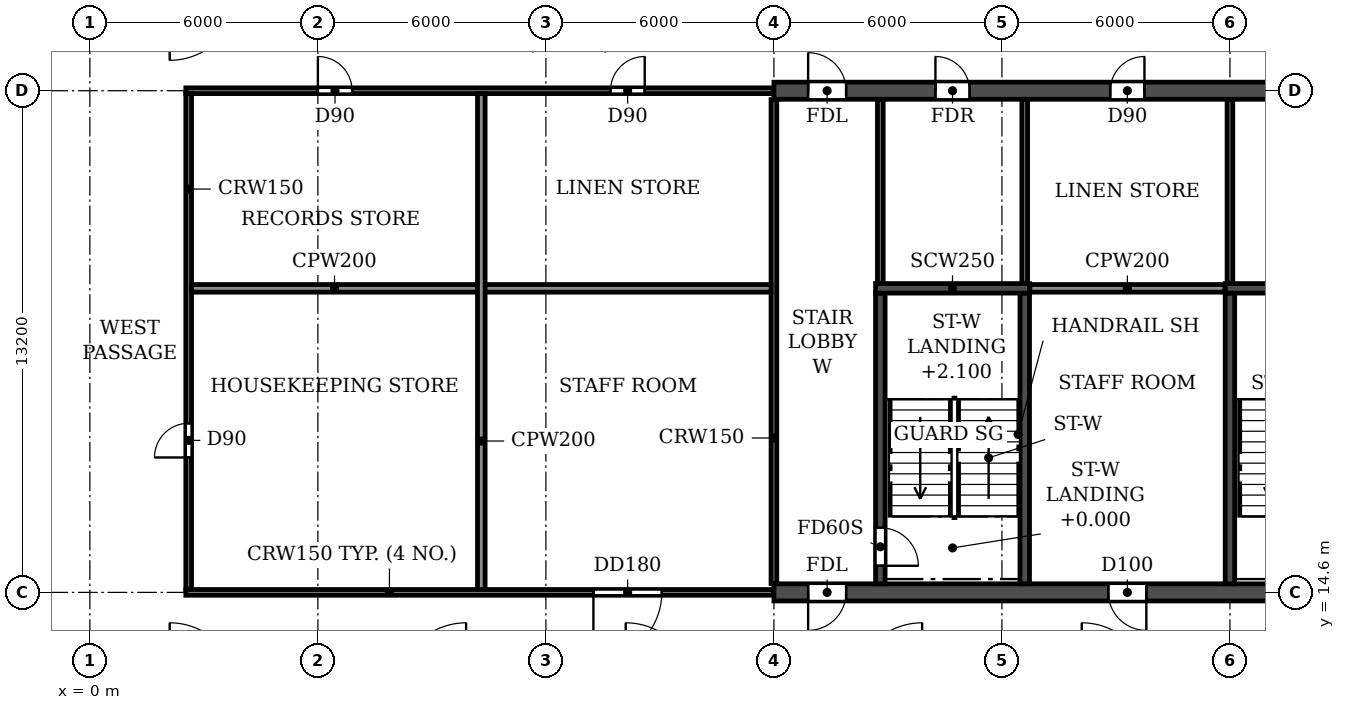
"""IFC4 building model, lengths in metres.
Left out: names, types, materials, properties, quantities, classifications, styles, units other than length and angle.
Written with IfcOpenShell. Run it as: python <this file> out.ifc"""

import sys

from ifc_helpers import new_model, si_unit, direction, frame, frame_2d, origin, place, context, subcontext, project, spatial, rectangle, extrude, element, fill, save


model = new_model("IFC4")
c1 = context("Model", 3, precision=1e-05, world=origin(), true_north=direction((0.0, 1.0)))
c2 = subcontext(c1, "Body", "Model", "MODEL_VIEW")
j1 = project(units=[si_unit("LENGTHUNIT", "METRE"), si_unit("PLANEANGLEUNIT", "RADIAN")], contexts=[c1])
p1 = place(None, origin())
s1 = spatial("IfcSite", under=j1, at=p1, CompositionType="ELEMENT")
p2 = place(p1, origin())
s2 = spatial("IfcBuilding", under=s1, at=p2, CompositionType="ELEMENT")
p3 = place(p2, frame((0.0, 0.0, 10.8)))
s3 = spatial("IfcBuildingStorey", under=s2, at=p3, CompositionType="ELEMENT", Elevation=10.8)
p4 = place(p3, frame((18.0, 14.6, 0.0), z_axis=(0.0, 0.0, 1.0), x_axis=(1.0, 0.0, 0.0)))
e1 = element("IfcWall", 1, at=p4, inside=s3, PredefinedType="SOLIDWALL", context=c2, shape_type="SweptSolid", body=[
    extrude(rectangle(XDim=66.0, YDim=0.45, at=frame_2d((33.0, 0.0))), origin(), (0.0, 0.0, 1.0), 3.92),
])
p5 = place(p4, frame((0.9, 0.0, 0.0)))
e2 = element("IfcOpeningElement", 2, at=p5, cuts=e1, PredefinedType="OPENING", context=c2, shape_type="SweptSolid", body=[
    extrude(rectangle(XDim=1.0, YDim=2.1, at=frame_2d((0.5, 1.05))), frame((0.0, 0.235, 0.0), z_axis=(0.0, -1.0, 0.0), x_axis=(1.0, 0.0, 0.0)), (0.0, 0.0, 1.0), 0.47),
])
p6 = place(p4, frame((8.8, 0.0, 0.0)))
e3 = element("IfcOpeningElement", 3, at=p6, cuts=e1, PredefinedType="OPENING", context=c2, shape_type="SweptSolid", body=[
    extrude(rectangle(XDim=1.0, YDim=2.1, at=frame_2d((0.5, 1.05))), frame((0.0, 0.235, 0.0), z_axis=(0.0, -1.0, 0.0), x_axis=(1.0, 0.0, 0.0)), (0.0, 0.0, 1.0), 0.47),
])
p7 = place(p4, frame((13.4, 0.0, 0.0)))
e4 = element("IfcOpeningElement", 4, at=p7, cuts=e1, PredefinedType="OPENING", context=c2, shape_type="SweptSolid", body=[
    extrude(rectangle(XDim=1.0, YDim=2.1, at=frame_2d((0.5, 1.05))), frame((0.0, 0.235, 0.0), z_axis=(0.0, -1.0, 0.0), x_axis=(1.0, 0.0, 0.0)), (0.0, 0.0, 1.0), 0.47),
])
p8 = place(p4, frame((24.7, 0.0, 0.0)))
e5 = element("IfcOpeningElement", 5, at=p8, cuts=e1, PredefinedType="OPENING", context=c2, shape_type="SweptSolid", body=[
    extrude(rectangle(XDim=1.0, YDim=2.1, at=frame_2d((0.5, 1.05))), frame((0.0, 0.235, 0.0), z_axis=(0.0, -1.0, 0.0), x_axis=(1.0, 0.0, 0.0)), (0.0, 0.0, 1.0), 0.47),
])
p9 = place(p4, frame((28.6, 0.0, 0.0)))
e6 = element("IfcOpeningElement", 6, at=p9, cuts=e1, PredefinedType="OPENING", context=c2, shape_type="SweptSolid", body=[
    extrude(rectangle(XDim=1.0, YDim=2.1, at=frame_2d((0.5, 1.05))), frame((0.0, 0.235, 0.0), z_axis=(0.0, -1.0, 0.0), x_axis=(1.0, 0.0, 0.0)), (0.0, 0.0, 1.0), 0.47),
])
p10 = place(p4, frame((32.5, 0.0, 0.0)))
e7 = element("IfcOpeningElement", 7, at=p10, cuts=e1, PredefinedType="OPENING", context=c2, shape_type="SweptSolid", body=[
    extrude(rectangle(XDim=1.0, YDim=2.1, at=frame_2d((0.5, 1.05))), frame((0.0, 0.235, 0.0), z_axis=(0.0, -1.0, 0.0), x_axis=(1.0, 0.0, 0.0)), (0.0, 0.0, 1.0), 0.47),
])
p11 = place(p4, frame((35.1, 0.0, 0.0)))
e8 = element("IfcOpeningElement", 8, at=p11, cuts=e1, PredefinedType="OPENING", context=c2, shape_type="SweptSolid", body=[
    extrude(rectangle(XDim=1.0, YDim=2.1, at=frame_2d((0.5, 1.05))), frame((0.0, 0.235, 0.0), z_axis=(0.0, -1.0, 0.0), x_axis=(1.0, 0.0, 0.0)), (0.0, 0.0, 1.0), 0.47),
])
p12 = place(p4, frame((39.0, 0.0, 0.0)))
e9 = element("IfcOpeningElement", 9, at=p12, cuts=e1, PredefinedType="OPENING", context=c2, shape_type="SweptSolid", body=[
    extrude(rectangle(XDim=1.0, YDim=2.1, at=frame_2d((0.5, 1.05))), frame((0.0, 0.235, 0.0), z_axis=(0.0, -1.0, 0.0), x_axis=(1.0, 0.0, 0.0)), (0.0, 0.0, 1.0), 0.47),
])
p13 = place(p4, frame((51.6, 0.0, 0.0)))
e10 = element("IfcOpeningElement", 10, at=p13, cuts=e1, PredefinedType="OPENING", context=c2, shape_type="SweptSolid", body=[
    extrude(rectangle(XDim=1.0, YDim=2.1, at=frame_2d((0.5, 1.05))), frame((0.0, 0.235, 0.0), z_axis=(0.0, -1.0, 0.0), x_axis=(1.0, 0.0, 0.0)), (0.0, 0.0, 1.0), 0.47),
])
p14 = place(p4, frame((56.25, 0.0, 0.0)))
e11 = element("IfcOpeningElement", 11, at=p14, cuts=e1, PredefinedType="OPENING", context=c2, shape_type="SweptSolid", body=[
    extrude(rectangle(XDim=0.9, YDim=2.1, at=frame_2d((0.45, 1.05))), frame((0.0, 0.235, 0.0), z_axis=(0.0, -1.0, 0.0), x_axis=(1.0, 0.0, 0.0)), (0.0, 0.0, 1.0), 0.47),
])
p15 = place(p4, frame((64.1, 0.0, 0.0)))
e12 = element("IfcOpeningElement", 12, at=p15, cuts=e1, PredefinedType="OPENING", context=c2, shape_type="SweptSolid", body=[
    extrude(rectangle(XDim=1.0, YDim=2.1, at=frame_2d((0.5, 1.05))), frame((0.0, 0.235, 0.0), z_axis=(0.0, -1.0, 0.0), x_axis=(1.0, 0.0, 0.0)), (0.0, 0.0, 1.0), 0.47),
])
p16 = place(p3, frame((18.0, 27.8, 0.0), z_axis=(0.0, 0.0, 1.0), x_axis=(1.0, 0.0, 0.0)))
e13 = element("IfcWall", 13, at=p16, inside=s3, PredefinedType="SOLIDWALL", context=c2, shape_type="SweptSolid", body=[
    extrude(rectangle(XDim=66.0, YDim=0.45, at=frame_2d((33.0, 0.0))), origin(), (0.0, 0.0, 1.0), 3.92),
])
p17 = place(p16, frame((0.9, 0.0, 0.0)))
e14 = element("IfcOpeningElement", 14, at=p17, cuts=e13, PredefinedType="OPENING", context=c2, shape_type="SweptSolid", body=[
    extrude(rectangle(XDim=1.0, YDim=2.1, at=frame_2d((0.5, 1.05))), frame((0.0, 0.235, 0.0), z_axis=(0.0, -1.0, 0.0), x_axis=(1.0, 0.0, 0.0)), (0.0, 0.0, 1.0), 0.47),
])
p18 = place(p16, frame((4.25, 0.0, 0.0)))
e15 = element("IfcOpeningElement", 15, at=p18, cuts=e13, PredefinedType="OPENING", context=c2, shape_type="SweptSolid", body=[
    extrude(rectangle(XDim=0.9, YDim=2.1, at=frame_2d((0.45, 1.05))), frame((0.0, 0.235, 0.0), z_axis=(0.0, -1.0, 0.0), x_axis=(1.0, 0.0, 0.0)), (0.0, 0.0, 1.0), 0.47),
])
p19 = place(p16, frame((8.85, 0.0, 0.0)))
e16 = element("IfcOpeningElement", 16, at=p19, cuts=e13, PredefinedType="OPENING", context=c2, shape_type="SweptSolid", body=[
    extrude(rectangle(XDim=0.9, YDim=2.1, at=frame_2d((0.45, 1.05))), frame((0.0, 0.235, 0.0), z_axis=(0.0, -1.0, 0.0), x_axis=(1.0, 0.0, 0.0)), (0.0, 0.0, 1.0), 0.47),
])
p20 = place(p16, frame((13.45, 0.0, 0.0)))
e17 = element("IfcOpeningElement", 17, at=p20, cuts=e13, PredefinedType="OPENING", context=c2, shape_type="SweptSolid", body=[
    extrude(rectangle(XDim=0.9, YDim=2.1, at=frame_2d((0.45, 1.05))), frame((0.0, 0.235, 0.0), z_axis=(0.0, -1.0, 0.0), x_axis=(1.0, 0.0, 0.0)), (0.0, 0.0, 1.0), 0.47),
])
p21 = place(p16, frame((18.95, 0.0, 0.0)))
e18 = element("IfcOpeningElement", 18, at=p21, cuts=e13, PredefinedType="OPENING", context=c2, shape_type="SweptSolid", body=[
    extrude(rectangle(XDim=1.5, YDim=2.1, at=frame_2d((0.75, 1.05))), frame((0.0, 0.235, 0.0), z_axis=(0.0, -1.0, 0.0), x_axis=(1.0, 0.0, 0.0)), (0.0, 0.0, 1.0), 0.47),
])
p22 = place(p16, frame((24.4, 0.0, 0.0)))
e19 = element("IfcOpeningElement", 19, at=p22, cuts=e13, PredefinedType="OPENING", context=c2, shape_type="SweptSolid", body=[
    extrude(rectangle(XDim=1.0, YDim=2.1, at=frame_2d((0.5, 1.05))), frame((0.0, 0.235, 0.0), z_axis=(0.0, -1.0, 0.0), x_axis=(1.0, 0.0, 0.0)), (0.0, 0.0, 1.0), 0.47),
])
p23 = place(p16, frame((29.6, 0.0, 0.0)))
e20 = element("IfcOpeningElement", 20, at=p23, cuts=e13, PredefinedType="OPENING", context=c2, shape_type="SweptSolid", body=[
    extrude(rectangle(XDim=1.0, YDim=2.1, at=frame_2d((0.5, 1.05))), frame((0.0, 0.235, 0.0), z_axis=(0.0, -1.0, 0.0), x_axis=(1.0, 0.0, 0.0)), (0.0, 0.0, 1.0), 0.47),
])
p24 = place(p16, frame((32.5, 0.0, 0.0)))
e21 = element("IfcOpeningElement", 21, at=p24, cuts=e13, PredefinedType="OPENING", context=c2, shape_type="SweptSolid", body=[
    extrude(rectangle(XDim=1.0, YDim=2.1, at=frame_2d((0.5, 1.05))), frame((0.0, 0.235, 0.0), z_axis=(0.0, -1.0, 0.0), x_axis=(1.0, 0.0, 0.0)), (0.0, 0.0, 1.0), 0.47),
])
p25 = place(p16, frame((38.0, 0.0, 0.0)))
e22 = element("IfcOpeningElement", 22, at=p25, cuts=e13, PredefinedType="OPENING", context=c2, shape_type="SweptSolid", body=[
    extrude(rectangle(XDim=1.0, YDim=2.1, at=frame_2d((0.5, 1.05))), frame((0.0, 0.235, 0.0), z_axis=(0.0, -1.0, 0.0), x_axis=(1.0, 0.0, 0.0)), (0.0, 0.0, 1.0), 0.47),
])
p26 = place(p16, frame((43.2, 0.0, 0.0)))
e23 = element("IfcOpeningElement", 23, at=p26, cuts=e13, PredefinedType="OPENING", context=c2, shape_type="SweptSolid", body=[
    extrude(rectangle(XDim=1.0, YDim=2.1, at=frame_2d((0.5, 1.05))), frame((0.0, 0.235, 0.0), z_axis=(0.0, -1.0, 0.0), x_axis=(1.0, 0.0, 0.0)), (0.0, 0.0, 1.0), 0.47),
])
p27 = place(p16, frame((47.1, 0.0, 0.0)))
e24 = element("IfcOpeningElement", 24, at=p27, cuts=e13, PredefinedType="OPENING", context=c2, shape_type="SweptSolid", body=[
    extrude(rectangle(XDim=1.0, YDim=2.1, at=frame_2d((0.5, 1.05))), frame((0.0, 0.235, 0.0), z_axis=(0.0, -1.0, 0.0), x_axis=(1.0, 0.0, 0.0)), (0.0, 0.0, 1.0), 0.47),
])
p28 = place(p16, frame((51.65, 0.0, 0.0)))
e25 = element("IfcOpeningElement", 25, at=p28, cuts=e13, PredefinedType="OPENING", context=c2, shape_type="SweptSolid", body=[
    extrude(rectangle(XDim=0.9, YDim=2.1, at=frame_2d((0.45, 1.05))), frame((0.0, 0.235, 0.0), z_axis=(0.0, -1.0, 0.0), x_axis=(1.0, 0.0, 0.0)), (0.0, 0.0, 1.0), 0.47),
])
p29 = place(p16, frame((56.2, 0.0, 0.0)))
e26 = element("IfcOpeningElement", 26, at=p29, cuts=e13, PredefinedType="OPENING", context=c2, shape_type="SweptSolid", body=[
    extrude(rectangle(XDim=1.0, YDim=2.1, at=frame_2d((0.5, 1.05))), frame((0.0, 0.235, 0.0), z_axis=(0.0, -1.0, 0.0), x_axis=(1.0, 0.0, 0.0)), (0.0, 0.0, 1.0), 0.47),
])
p30 = place(p16, frame((60.85, 0.0, 0.0)))
e27 = element("IfcOpeningElement", 27, at=p30, cuts=e13, PredefinedType="OPENING", context=c2, shape_type="SweptSolid", body=[
    extrude(rectangle(XDim=0.9, YDim=2.1, at=frame_2d((0.45, 1.05))), frame((0.0, 0.235, 0.0), z_axis=(0.0, -1.0, 0.0), x_axis=(1.0, 0.0, 0.0)), (0.0, 0.0, 1.0), 0.47),
])
p31 = place(p16, frame((64.1, 0.0, 0.0)))
e28 = element("IfcOpeningElement", 28, at=p31, cuts=e13, PredefinedType="OPENING", context=c2, shape_type="SweptSolid", body=[
    extrude(rectangle(XDim=1.0, YDim=2.1, at=frame_2d((0.5, 1.05))), frame((0.0, 0.235, 0.0), z_axis=(0.0, -1.0, 0.0), x_axis=(1.0, 0.0, 0.0)), (0.0, 0.0, 1.0), 0.47),
])
p32 = place(p3, frame((30.0, 14.825, 0.0), z_axis=(0.0, 0.0, 1.0), x_axis=(0.0, 1.0, 0.0)))
e29 = element("IfcWall", 29, at=p32, inside=s3, PredefinedType="SOLIDWALL", context=c2, shape_type="SweptSolid", body=[
    extrude(rectangle(XDim=7.65, YDim=0.25, at=frame_2d((3.825, 0.0))), origin(), (0.0, 0.0, 1.0), 3.92),
])
p33 = place(p3, frame((29.875, 22.6, 0.0), z_axis=(0.0, 0.0, 1.0), x_axis=(1.0, 0.0, 0.0)))
e30 = element("IfcWall", 30, at=p33, inside=s3, PredefinedType="SOLIDWALL", context=c2, shape_type="SweptSolid", body=[
    extrude(rectangle(XDim=4.05, YDim=0.25, at=frame_2d((2.025, 0.0))), origin(), (0.0, 0.0, 1.0), 3.92),
])
p34 = place(p3, frame((20.8, 14.825, 0.0), z_axis=(0.0, 0.0, 1.0), x_axis=(0.0, 1.0, 0.0)))
e31 = element("IfcWall", 31, at=p34, inside=s3, PredefinedType="SOLIDWALL", context=c2, shape_type="SweptSolid", body=[
    extrude(rectangle(XDim=7.65, YDim=0.25, at=frame_2d((3.825, 0.0))), origin(), (0.0, 0.0, 1.0), 3.92),
])
p35 = place(p34, frame((0.475, 0.0, 0.0)))
e32 = element("IfcOpeningElement", 32, at=p35, cuts=e31, PredefinedType="OPENING", context=c2, shape_type="SweptSolid", body=[
    extrude(rectangle(XDim=1.0, YDim=2.1, at=frame_2d((0.5, 1.05))), frame((0.0, 0.135, 0.0), z_axis=(0.0, -1.0, 0.0), x_axis=(1.0, 0.0, 0.0)), (0.0, 0.0, 1.0), 0.27),
])
p36 = place(p3, frame((24.6, 14.825, 0.0), z_axis=(0.0, 0.0, 1.0), x_axis=(0.0, 1.0, 0.0)))
e33 = element("IfcWall", 33, at=p36, inside=s3, PredefinedType="SOLIDWALL", context=c2, shape_type="SweptSolid", body=[
    extrude(rectangle(XDim=7.65, YDim=0.25, at=frame_2d((3.825, 0.0))), origin(), (0.0, 0.0, 1.0), 3.92),
])
p37 = place(p3, frame((20.675, 22.6, 0.0), z_axis=(0.0, 0.0, 1.0), x_axis=(1.0, 0.0, 0.0)))
e34 = element("IfcWall", 34, at=p37, inside=s3, PredefinedType="SOLIDWALL", context=c2, shape_type="SweptSolid", body=[
    extrude(rectangle(XDim=4.05, YDim=0.25, at=frame_2d((2.025, 0.0))), origin(), (0.0, 0.0, 1.0), 3.92),
])
p38 = place(p3, frame((2.525, 14.6, 0.0), z_axis=(0.0, 0.0, 1.0), x_axis=(1.0, 0.0, 0.0)))
e35 = element("IfcWall", 35, at=p38, inside=s3, PredefinedType="PARTITIONING", context=c2, shape_type="SweptSolid", body=[
    extrude(rectangle(XDim=15.465, YDim=0.15, at=frame_2d((7.732, 0.0))), origin(), (0.0, 0.0, 1.0), 3.92),
])
p39 = place(p38, frame((10.725, 0.0, 0.0)))
e36 = element("IfcOpeningElement", 36, at=p39, cuts=e35, PredefinedType="OPENING", context=c2, shape_type="SweptSolid", body=[
    extrude(rectangle(XDim=1.8, YDim=2.1, at=frame_2d((0.9, 1.05))), frame((0.0, 0.085, 0.0), z_axis=(0.0, -1.0, 0.0), x_axis=(1.0, 0.0, 0.0)), (0.0, 0.0, 1.0), 0.17),
])
p40 = place(p3, frame((2.525, 27.8, 0.0), z_axis=(0.0, 0.0, 1.0), x_axis=(1.0, 0.0, 0.0)))
e37 = element("IfcWall", 37, at=p40, inside=s3, PredefinedType="PARTITIONING", context=c2, shape_type="SweptSolid", body=[
    extrude(rectangle(XDim=15.465, YDim=0.15, at=frame_2d((7.732, 0.0))), origin(), (0.0, 0.0, 1.0), 3.92),
])
p41 = place(p40, frame((3.475, 0.0, 0.0)))
e38 = element("IfcOpeningElement", 38, at=p41, cuts=e37, PredefinedType="OPENING", context=c2, shape_type="SweptSolid", body=[
    extrude(rectangle(XDim=0.9, YDim=2.1, at=frame_2d((0.45, 1.05))), frame((0.0, 0.085, 0.0), z_axis=(0.0, -1.0, 0.0), x_axis=(1.0, 0.0, 0.0)), (0.0, 0.0, 1.0), 0.17),
])
p42 = place(p40, frame((11.175, 0.0, 0.0)))
e39 = element("IfcOpeningElement", 39, at=p42, cuts=e37, PredefinedType="OPENING", context=c2, shape_type="SweptSolid", body=[
    extrude(rectangle(XDim=0.9, YDim=2.1, at=frame_2d((0.45, 1.05))), frame((0.0, 0.085, 0.0), z_axis=(0.0, -1.0, 0.0), x_axis=(1.0, 0.0, 0.0)), (0.0, 0.0, 1.0), 0.17),
])
p43 = place(p3, frame((2.6, 14.675, 0.0), z_axis=(0.0, 0.0, 1.0), x_axis=(0.0, 1.0, 0.0)))
e40 = element("IfcWall", 40, at=p43, inside=s3, PredefinedType="PARTITIONING", context=c2, shape_type="SweptSolid", body=[
    extrude(rectangle(XDim=13.05, YDim=0.15, at=frame_2d((6.525, 0.0))), origin(), (0.0, 0.0, 1.0), 3.92),
])
p44 = place(p43, frame((3.475, 0.0, 0.0)))
e41 = element("IfcOpeningElement", 41, at=p44, cuts=e40, PredefinedType="OPENING", context=c2, shape_type="SweptSolid", body=[
    extrude(rectangle(XDim=0.9, YDim=2.1, at=frame_2d((0.45, 1.05))), frame((0.0, 0.085, 0.0), z_axis=(0.0, -1.0, 0.0), x_axis=(1.0, 0.0, 0.0)), (0.0, 0.0, 1.0), 0.17),
])
p45 = place(p3, frame((18.0, 14.835, 0.0), z_axis=(0.0, 0.0, 1.0), x_axis=(0.0, 1.0, 0.0)))
e42 = element("IfcWall", 42, at=p45, inside=s3, PredefinedType="PARTITIONING", context=c2, shape_type="SweptSolid", body=[
    extrude(rectangle(XDim=12.73, YDim=0.15, at=frame_2d((6.365, 0.0))), origin(), (0.0, 0.0, 1.0), 3.92),
])
p46 = place(p3, frame((2.675, 22.6, 0.0), z_axis=(0.0, 0.0, 1.0), x_axis=(1.0, 0.0, 0.0)))
e43 = element("IfcWall", 43, at=p46, inside=s3, PredefinedType="PARTITIONING", context=c2, shape_type="SweptSolid", body=[
    extrude(rectangle(XDim=15.25, YDim=0.2, at=frame_2d((7.625, 0.0))), origin(), (0.0, 0.0, 1.0), 3.92),
])
p47 = place(p3, frame((24.735, 22.6, 0.0), z_axis=(0.0, 0.0, 1.0), x_axis=(1.0, 0.0, 0.0)))
e44 = element("IfcWall", 44, at=p47, inside=s3, PredefinedType="PARTITIONING", context=c2, shape_type="SweptSolid", body=[
    extrude(rectangle(XDim=5.13, YDim=0.2, at=frame_2d((2.565, 0.0))), origin(), (0.0, 0.0, 1.0), 3.92),
])
p48 = place(p3, frame((10.3, 14.675, 0.0), z_axis=(0.0, 0.0, 1.0), x_axis=(0.0, 1.0, 0.0)))
e45 = element("IfcWall", 45, at=p48, inside=s3, PredefinedType="PARTITIONING", context=c2, shape_type="SweptSolid", body=[
    extrude(rectangle(XDim=13.05, YDim=0.2, at=frame_2d((6.525, 0.0))), origin(), (0.0, 0.0, 1.0), 3.92),
])
for number, where, z_axis, x_axis in (
    (46, (20.8, 22.735, 0.0), (0.0, 0.0, 1.0), (0.0, 1.0, 0.0)),
    (47, (24.6, 22.735, 0.0), (0.0, 0.0, 1.0), (0.0, 1.0, 0.0)),
    (48, (30.0, 22.735, 0.0), (0.0, 0.0, 1.0), (0.0, 1.0, 0.0)),
):
    element("IfcWall", number, at=place(p3, frame(where, z_axis=z_axis, x_axis=x_axis)), inside=s3, PredefinedType="PARTITIONING", context=c2, shape_type="SweptSolid", body=[
        extrude(rectangle(XDim=4.83, YDim=0.15, at=frame_2d((2.415, 0.0))), origin(), (0.0, 0.0, 1.0), 3.92),
    ])
p49 = place(p41, origin())
e49 = element("IfcDoor", 49, at=p49, inside=s3, OperationType="SINGLE_SWING_LEFT", PredefinedType="DOOR", context=c2, shape_type="SweptSolid", body=[
    extrude(rectangle(XDim=0.9, YDim=2.1, at=frame_2d((0.45, 1.05))), frame((0.0, 0.025, 0.0), z_axis=(0.0, -1.0, 0.0), x_axis=(1.0, 0.0, 0.0)), (0.0, 0.0, 1.0), 0.05),
])
fill(e38, e49)
p50 = place(p42, origin())
e50 = element("IfcDoor", 50, at=p50, inside=s3, OperationType="SINGLE_SWING_RIGHT", PredefinedType="DOOR", context=c2, shape_type="SweptSolid", body=[
    extrude(rectangle(XDim=0.9, YDim=2.1, at=frame_2d((0.45, 1.05))), frame((0.0, 0.025, 0.0), z_axis=(0.0, -1.0, 0.0), x_axis=(1.0, 0.0, 0.0)), (0.0, 0.0, 1.0), 0.05),
])
fill(e39, e50)
p51 = place(p17, origin())
e51 = element("IfcDoor", 51, at=p51, inside=s3, OperationType="SINGLE_SWING_LEFT", PredefinedType="DOOR", context=c2, shape_type="SweptSolid", body=[
    extrude(rectangle(XDim=1.0, YDim=2.1, at=frame_2d((0.5, 1.05))), frame((0.0, 0.025, 0.0), z_axis=(0.0, -1.0, 0.0), x_axis=(1.0, 0.0, 0.0)), (0.0, 0.0, 1.0), 0.05),
])
fill(e14, e51)
p52 = place(p18, origin())
e52 = element("IfcDoor", 52, at=p52, inside=s3, OperationType="SINGLE_SWING_LEFT", PredefinedType="DOOR", context=c2, shape_type="SweptSolid", body=[
    extrude(rectangle(XDim=0.9, YDim=2.1, at=frame_2d((0.45, 1.05))), frame((0.0, 0.025, 0.0), z_axis=(0.0, -1.0, 0.0), x_axis=(1.0, 0.0, 0.0)), (0.0, 0.0, 1.0), 0.05),
])
fill(e15, e52)
p53 = place(p19, origin())
e53 = element("IfcDoor", 53, at=p53, inside=s3, OperationType="SINGLE_SWING_RIGHT", PredefinedType="DOOR", context=c2, shape_type="SweptSolid", body=[
    extrude(rectangle(XDim=0.9, YDim=2.1, at=frame_2d((0.45, 1.05))), frame((0.0, 0.025, 0.0), z_axis=(0.0, -1.0, 0.0), x_axis=(1.0, 0.0, 0.0)), (0.0, 0.0, 1.0), 0.05),
])
fill(e16, e53)
p54 = place(p39, frame((1.8, 0.0, 0.0), z_axis=(0.0, 0.0, 1.0), x_axis=(-1.0, 0.0, 0.0)))
e54 = element("IfcDoor", 54, at=p54, inside=s3, OperationType="DOUBLE_DOOR_SINGLE_SWING", PredefinedType="DOOR", context=c2, shape_type="SweptSolid", body=[
    extrude(rectangle(XDim=1.8, YDim=2.1, at=frame_2d((0.9, 1.05))), frame((0.0, 0.025, 0.0), z_axis=(0.0, -1.0, 0.0), x_axis=(1.0, 0.0, 0.0)), (0.0, 0.0, 1.0), 0.05),
])
fill(e36, e54)
p55 = place(p5, frame((1.0, 0.0, 0.0), z_axis=(0.0, 0.0, 1.0), x_axis=(-1.0, 0.0, 0.0)))
e55 = element("IfcDoor", 55, at=p55, inside=s3, OperationType="SINGLE_SWING_RIGHT", PredefinedType="DOOR", context=c2, shape_type="SweptSolid", body=[
    extrude(rectangle(XDim=1.0, YDim=2.1, at=frame_2d((0.5, 1.05))), frame((0.0, 0.025, 0.0), z_axis=(0.0, -1.0, 0.0), x_axis=(1.0, 0.0, 0.0)), (0.0, 0.0, 1.0), 0.05),
])
fill(e2, e55)
p56 = place(p6, frame((1.0, 0.0, 0.0), z_axis=(0.0, 0.0, 1.0), x_axis=(-1.0, 0.0, 0.0)))
e56 = element("IfcDoor", 56, at=p56, inside=s3, OperationType="SINGLE_SWING_LEFT", PredefinedType="DOOR", context=c2, shape_type="SweptSolid", body=[
    extrude(rectangle(XDim=1.0, YDim=2.1, at=frame_2d((0.5, 1.05))), frame((0.0, 0.025, 0.0), z_axis=(0.0, -1.0, 0.0), x_axis=(1.0, 0.0, 0.0)), (0.0, 0.0, 1.0), 0.05),
])
fill(e3, e56)
p57 = place(p44, origin())
e57 = element("IfcDoor", 57, at=p57, inside=s3, OperationType="SINGLE_SWING_LEFT", PredefinedType="DOOR", context=c2, shape_type="SweptSolid", body=[
    extrude(rectangle(XDim=0.9, YDim=2.1, at=frame_2d((0.45, 1.05))), frame((0.0, 0.025, 0.0), z_axis=(0.0, -1.0, 0.0), x_axis=(1.0, 0.0, 0.0)), (0.0, 0.0, 1.0), 0.05),
])
fill(e41, e57)
p58 = place(p35, frame((1.0, 0.0, 0.0), z_axis=(0.0, 0.0, 1.0), x_axis=(-1.0, 0.0, 0.0)))
e58 = element("IfcDoor", 58, at=p58, inside=s3, OperationType="SINGLE_SWING_RIGHT", PredefinedType="DOOR", context=c2, shape_type="SweptSolid", body=[
    extrude(rectangle(XDim=1.0, YDim=2.1, at=frame_2d((0.5, 1.05))), frame((0.0, 0.025, 0.0), z_axis=(0.0, -1.0, 0.0), x_axis=(1.0, 0.0, 0.0)), (0.0, 0.0, 1.0), 0.05),
])
fill(e32, e58)
save(model, sys.argv[1])
